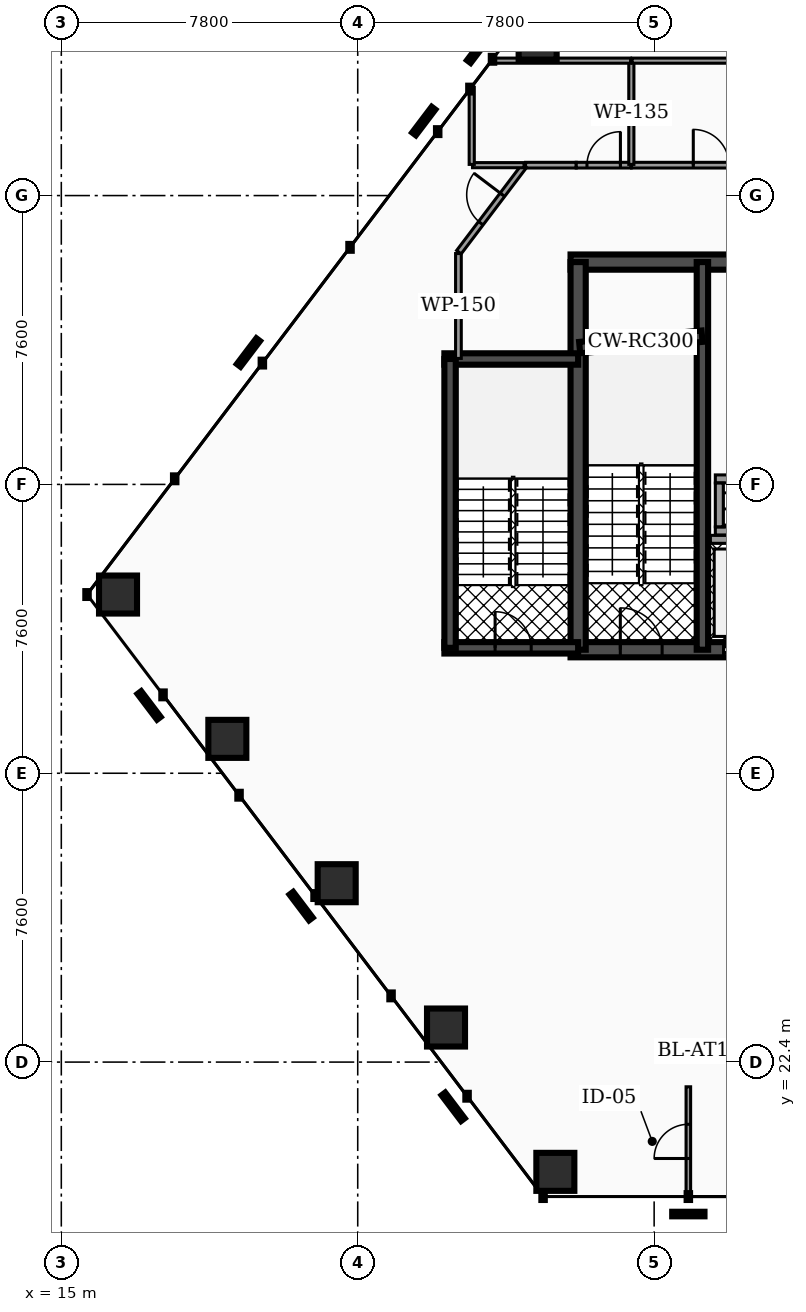
"""IFC4 building model, lengths in metres.
Left out: names, types, materials, properties, quantities, classifications, styles, units other than length and angle.
Written with IfcOpenShell. Run it as: python <this file> out.ifc"""

import sys

from ifc_helpers import new_model, si_unit, direction, frame, frame_2d, origin, origin_2d, place, context, subcontext, project, spatial, rectangle, hollow_rectangle, extrude, element, fill, save


model = new_model("IFC4")
c1 = context("Model", 3, precision=1e-05, world=origin(), true_north=direction((0.0, 1.0)))
c2 = subcontext(c1, "Body", "Model", "MODEL_VIEW")
j1 = project(units=[si_unit("LENGTHUNIT", "METRE"), si_unit("PLANEANGLEUNIT", "RADIAN")], contexts=[c1])
p1 = place(None, origin())
s1 = spatial("IfcSite", under=j1, at=p1, CompositionType="ELEMENT")
p2 = place(p1, origin())
s2 = spatial("IfcBuilding", under=s1, at=p2, CompositionType="ELEMENT")
p3 = place(p2, frame((0.0, 0.0, 52.02)))
s3 = spatial("IfcBuildingStorey", under=s2, at=p3, CompositionType="ELEMENT", Elevation=52.02)
p4 = place(p3, frame((28.4, 43.45, 0.0), z_axis=(0.0, 0.0, 1.0), x_axis=(1.0, 0.0, 0.0)))
e1 = element("IfcWall", 1, at=p4, inside=s3, PredefinedType="SHEAR", context=c2, shape_type="SweptSolid", body=[
    extrude(rectangle(XDim=20.06, YDim=0.4, at=frame_2d((10.03, 0.0))), origin(), (0.0, 0.0, 1.0), 3.82),
])
p5 = place(p3, frame((28.4, 33.25, 0.0), z_axis=(0.0, 0.0, 1.0), x_axis=(1.0, 0.0, 0.0)))
e2 = element("IfcWall", 2, at=p5, inside=s3, PredefinedType="SHEAR", context=c2, shape_type="SweptSolid", body=[
    extrude(rectangle(XDim=20.06, YDim=0.4, at=frame_2d((10.03, 0.0))), origin(), (0.0, 0.0, 1.0), 3.82),
])
p6 = place(p5, frame((4.03, 0.0, 0.0)))
e3 = element("IfcOpeningElement", 3, at=p6, cuts=e2, PredefinedType="OPENING", context=c2, shape_type="SweptSolid", body=[
    extrude(rectangle(XDim=1.1, YDim=2.15, at=frame_2d((0.55, 1.075))), frame((0.0, 0.21, 0.0), z_axis=(0.0, -1.0, 0.0), x_axis=(1.0, 0.0, 0.0)), (0.0, 0.0, 1.0), 0.42),
])
p7 = place(p5, frame((14.87, 0.0, 0.0)))
e4 = element("IfcOpeningElement", 4, at=p7, cuts=e2, PredefinedType="OPENING", context=c2, shape_type="SweptSolid", body=[
    extrude(rectangle(XDim=1.1, YDim=2.15, at=frame_2d((0.55, 1.075))), frame((0.0, 0.21, 0.0), z_axis=(0.0, -1.0, 0.0), x_axis=(1.0, 0.0, 0.0)), (0.0, 0.0, 1.0), 0.42),
])
p8 = place(p5, frame((1.31, 0.0, 0.0)))
e5 = element("IfcOpeningElement", 5, at=p8, cuts=e2, PredefinedType="OPENING", context=c2, shape_type="SweptSolid", body=[
    extrude(rectangle(XDim=1.1, YDim=2.2, at=frame_2d((0.55, 1.1))), frame((0.0, 0.21, 0.0), z_axis=(0.0, -1.0, 0.0), x_axis=(1.0, 0.0, 0.0)), (0.0, 0.0, 1.0), 0.42),
])
p9 = place(p5, frame((9.44, 0.0, 0.0)))
e6 = element("IfcOpeningElement", 6, at=p9, cuts=e2, PredefinedType="OPENING", context=c2, shape_type="SweptSolid", body=[
    extrude(rectangle(XDim=1.12, YDim=2.05, at=frame_2d((0.56, 1.025))), frame((0.0, 0.21, 0.0), z_axis=(0.0, -1.0, 0.0), x_axis=(1.0, 0.0, 0.0)), (0.0, 0.0, 1.0), 0.42),
])
p10 = place(p5, frame((17.65, 0.0, 0.0)))
e7 = element("IfcOpeningElement", 7, at=p10, cuts=e2, PredefinedType="OPENING", context=c2, shape_type="SweptSolid", body=[
    extrude(rectangle(XDim=1.1, YDim=2.2, at=frame_2d((0.55, 1.1))), frame((0.0, 0.21, 0.0), z_axis=(0.0, -1.0, 0.0), x_axis=(1.0, 0.0, 0.0)), (0.0, 0.0, 1.0), 0.42),
])
p11 = place(p3, frame((28.6, 33.25, 0.0), z_axis=(0.0, 0.0, 1.0), x_axis=(0.0, 1.0, 0.0)))
e8 = element("IfcWall", 8, at=p11, inside=s3, PredefinedType="SHEAR", context=c2, shape_type="SweptSolid", body=[
    extrude(rectangle(XDim=10.2, YDim=0.4, at=frame_2d((5.1, 0.0))), origin(), (0.0, 0.0, 1.0), 3.82),
])
p12 = place(p3, frame((31.87, 33.25, 0.0), z_axis=(0.0, 0.0, 1.0), x_axis=(0.0, 1.0, 0.0)))
e9 = element("IfcWall", 9, at=p12, inside=s3, PredefinedType="SHEAR", context=c2, shape_type="SweptSolid", body=[
    extrude(rectangle(XDim=10.2, YDim=0.3, at=frame_2d((5.1, 0.0))), origin(), (0.0, 0.0, 1.0), 3.82),
])
p13 = place(p3, frame((28.64, 41.2, 0.0), z_axis=(0.0, 0.0, 1.0), x_axis=(0.995687118776, 0.092774789157, 0.0)))
e10 = element("IfcWall", 10, at=p13, inside=s3, PredefinedType="SHEAR", context=c2, shape_type="SweptSolid", body=[
    extrude(rectangle(XDim=3.234, YDim=0.3, at=frame_2d((1.617, 0.0))), origin(), (0.0, 0.0, 1.0), 3.82),
])
p14 = place(p3, frame((25.08, 40.9, 0.0), z_axis=(0.0, 0.0, 1.0), x_axis=(1.0, 0.0, 0.0)))
e11 = element("IfcWall", 11, at=p14, inside=s3, PredefinedType="SHEAR", context=c2, shape_type="SweptSolid", body=[
    extrude(rectangle(XDim=3.52, YDim=0.3, at=frame_2d((1.76, 0.0))), origin(), (0.0, 0.0, 1.0), 3.82),
])
p15 = place(p3, frame((25.08, 33.3, 0.0), z_axis=(0.0, 0.0, 1.0), x_axis=(1.0, 0.0, 0.0)))
e12 = element("IfcWall", 12, at=p15, inside=s3, PredefinedType="SHEAR", context=c2, shape_type="SweptSolid", body=[
    extrude(rectangle(XDim=3.52, YDim=0.3, at=frame_2d((1.76, 0.0))), origin(), (0.0, 0.0, 1.0), 3.82),
])
p16 = place(p15, frame((1.335, 0.0, 0.0)))
e13 = element("IfcOpeningElement", 13, at=p16, cuts=e12, PredefinedType="OPENING", context=c2, shape_type="SweptSolid", body=[
    extrude(rectangle(XDim=0.95, YDim=2.2, at=frame_2d((0.475, 1.1))), frame((0.0, 0.16, 0.0), z_axis=(0.0, -1.0, 0.0), x_axis=(1.0, 0.0, 0.0)), (0.0, 0.0, 1.0), 0.32),
])
p17 = place(p3, frame((25.23, 33.3, 0.0), z_axis=(0.0, 0.0, 1.0), x_axis=(0.0, 1.0, 0.0)))
e14 = element("IfcWall", 14, at=p17, inside=s3, PredefinedType="SHEAR", context=c2, shape_type="SweptSolid", body=[
    extrude(rectangle(XDim=7.6, YDim=0.3, at=frame_2d((3.8, 0.0))), origin(), (0.0, 0.0, 1.0), 3.82),
])
for number, where, z_axis, x_axis in (
    (15, (27.534, 49.278, 0.0), (0.0, 0.0, 1.0), (1.0, 0.0, 0.0)),
    (16, (16.492, 34.702, 0.0), (0.0, 0.0, 1.0), (1.0, 0.0, 0.0)),
    (17, (19.369, 30.905, 0.0), (0.0, 0.0, 1.0), (1.0, 0.0, 0.0)),
    (18, (22.246, 27.107, 0.0), (0.0, 0.0, 1.0), (1.0, 0.0, 0.0)),
    (19, (25.123, 23.309, 0.0), (0.0, 0.0, 1.0), (1.0, 0.0, 0.0)),
    (20, (28.0, 19.512, 0.0), (0.0, 0.0, 1.0), (1.0, 0.0, 0.0)),
):
    element("IfcColumn", number, at=place(p3, frame(where, z_axis=z_axis, x_axis=x_axis)), inside=s3, PredefinedType="COLUMN", context=c2, shape_type="SweptSolid", body=[
        extrude(hollow_rectangle(XDim=1.0, YDim=1.0, WallThickness=0.05, at=origin_2d()), origin(), (0.0, 0.0, 1.0), 3.82),
    ])
p18 = place(p3, frame((32.08, 36.155, 0.0), z_axis=(0.0, 0.0, 1.0), x_axis=(1.0, 0.0, 0.0)))
e21 = element("IfcWall", 21, at=p18, inside=s3, PredefinedType="SOLIDWALL", context=c2, shape_type="SweptSolid", body=[
    extrude(rectangle(XDim=1.8, YDim=0.21, at=frame_2d((0.9, 0.0))), origin(), (0.0, 0.0, 1.0), 2.792),
])
for number, where, z_axis, x_axis in (
    (22, (32.21, 36.375, 0.0), (0.0, 0.0, 1.0), (1.0, 0.0, 0.0)),
    (23, (32.21, 37.745, 0.0), (0.0, 0.0, 1.0), (1.0, 0.0, 0.0)),
):
    element("IfcWall", number, at=place(p3, frame(where, z_axis=z_axis, x_axis=x_axis)), inside=s3, PredefinedType="SOLIDWALL", context=c2, shape_type="SweptSolid", body=[
        extrude(rectangle(XDim=1.6, YDim=0.21, at=frame_2d((0.8, 0.0))), origin(), (0.0, 0.0, 1.0), 3.82),
    ])
p19 = place(p3, frame((32.315, 36.485, 0.0), z_axis=(0.0, 0.0, 1.0), x_axis=(0.0, 1.0, 0.0)))
e24 = element("IfcWall", 24, at=p19, inside=s3, PredefinedType="SOLIDWALL", context=c2, shape_type="SweptSolid", body=[
    extrude(rectangle(XDim=1.15, YDim=0.21, at=frame_2d((0.575, 0.0))), origin(), (0.0, 0.0, 1.0), 3.82),
])
p20 = place(p3, frame((27.217, 46.0, 0.0), z_axis=(0.0, 0.0, 1.0), x_axis=(1.0, 0.0, 0.0)))
e25 = element("IfcWall", 25, at=p20, inside=s3, PredefinedType="PARTITIONING", context=c2, shape_type="SweptSolid", body=[
    extrude(rectangle(XDim=1.333, YDim=0.15, at=frame_2d((0.667, 0.0))), origin(), (0.0, 0.0, 1.0), 2.777),
])
p21 = place(p3, frame((28.55, 46.0, 0.0), z_axis=(0.0, 0.0, 1.0), x_axis=(1.0, 0.0, 0.0)))
e26 = element("IfcWall", 26, at=p21, inside=s3, PredefinedType="PARTITIONING", context=c2, shape_type="SweptSolid", body=[
    extrude(rectangle(XDim=1.445, YDim=0.15, at=frame_2d((0.723, 0.0))), origin(), (0.0, 0.0, 1.0), 2.777),
])
p22 = place(p21, frame((0.282, 0.0, 0.0)))
e27 = element("IfcOpeningElement", 27, at=p22, cuts=e26, PredefinedType="OPENING", context=c2, shape_type="SweptSolid", body=[
    extrude(rectangle(XDim=0.88, YDim=2.05, at=frame_2d((0.44, 1.025))), frame((0.0, 0.085, 0.0), z_axis=(0.0, -1.0, 0.0), x_axis=(1.0, 0.0, 0.0)), (0.0, 0.0, 1.0), 0.17),
])
p23 = place(p3, frame((30.005, 46.0, 0.0), z_axis=(0.0, 0.0, 1.0), x_axis=(1.0, 0.0, 0.0)))
e28 = element("IfcWall", 28, at=p23, inside=s3, PredefinedType="PARTITIONING", context=c2, shape_type="SweptSolid", body=[
    extrude(rectangle(XDim=4.19, YDim=0.15, at=frame_2d((2.095, 0.0))), origin(), (0.0, 0.0, 1.0), 2.777),
])
p24 = place(p23, frame((1.625, 0.0, 0.0)))
e29 = element("IfcOpeningElement", 29, at=p24, cuts=e28, PredefinedType="OPENING", context=c2, shape_type="SweptSolid", body=[
    extrude(rectangle(XDim=0.94, YDim=2.05, at=frame_2d((0.47, 1.025))), frame((0.0, 0.085, 0.0), z_axis=(0.0, -1.0, 0.0), x_axis=(1.0, 0.0, 0.0)), (0.0, 0.0, 1.0), 0.17),
])
p25 = place(p3, frame((25.45, 40.915, 0.0), z_axis=(0.0, 0.0, 1.0), x_axis=(0.0, 1.0, 0.0)))
e30 = element("IfcWall", 30, at=p25, inside=s3, PredefinedType="PARTITIONING", context=c2, shape_type="SweptSolid", body=[
    extrude(rectangle(XDim=2.759, YDim=0.15, at=frame_2d((1.38, 0.0))), origin(), (0.0, 0.0, 1.0), 2.777),
])
p26 = place(p3, frame((25.462, 43.71, 0.0), z_axis=(0.0, 0.0, 1.0), x_axis=(0.603800014115, 0.797135837204, 0.0)))
e31 = element("IfcWall", 31, at=p26, inside=s3, PredefinedType="PARTITIONING", context=c2, shape_type="SweptSolid", body=[
    extrude(rectangle(XDim=2.853, YDim=0.15, at=frame_2d((1.426, 0.0))), origin(), (0.0, 0.0, 1.0), 2.777),
])
p27 = place(p26, frame((0.956, 0.0, 0.0)))
e32 = element("IfcOpeningElement", 32, at=p27, cuts=e31, PredefinedType="OPENING", context=c2, shape_type="SweptSolid", body=[
    extrude(rectangle(XDim=0.94, YDim=2.05, at=frame_2d((0.47, 1.025))), frame((0.0, 0.085, 0.0), z_axis=(0.0, -1.0, 0.0), x_axis=(1.0, 0.0, 0.0)), (0.0, 0.0, 1.0), 0.17),
])
p28 = place(p3, frame((30.0, 46.02, 0.0), z_axis=(0.0, 0.0, 1.0), x_axis=(0.0, 1.0, 0.0)))
e33 = element("IfcWall", 33, at=p28, inside=s3, PredefinedType="PARTITIONING", context=c2, shape_type="SweptSolid", body=[
    extrude(rectangle(XDim=2.71, YDim=0.135, at=frame_2d((1.355, 0.0))), origin(), (0.0, 0.0, 1.0), 2.777),
])
p29 = place(p3, frame((25.82, 46.0, 0.0), z_axis=(0.0, 0.0, 1.0), x_axis=(1.0, 0.0, 0.0)))
e34 = element("IfcWall", 34, at=p29, inside=s3, PredefinedType="PARTITIONING", context=c2, shape_type="SweptSolid", body=[
    extrude(rectangle(XDim=1.356, YDim=0.135, at=frame_2d((0.678, 0.0))), origin(), (0.0, 0.0, 1.0), 2.777),
])
p30 = place(p3, frame((25.8, 46.02, 0.0), z_axis=(0.0, 0.0, 1.0), x_axis=(0.0, 1.0, 0.0)))
e35 = element("IfcWall", 35, at=p30, inside=s3, PredefinedType="PARTITIONING", context=c2, shape_type="SweptSolid", body=[
    extrude(rectangle(XDim=2.03, YDim=0.135, at=frame_2d((1.015, 0.0))), origin(), (0.0, 0.0, 1.0), 2.777),
])
p31 = place(p3, frame((26.334, 48.75, 0.0), z_axis=(0.0, 0.0, 1.0), x_axis=(1.0, 0.0, 0.0)))
e36 = element("IfcWall", 36, at=p31, inside=s3, PredefinedType="PARTITIONING", context=c2, shape_type="SweptSolid", body=[
    extrude(rectangle(XDim=3.646, YDim=0.135, at=frame_2d((1.823, 0.0))), origin(), (0.0, 0.0, 1.0), 2.777),
])
p32 = place(p3, frame((30.02, 48.75, 0.0), z_axis=(0.0, 0.0, 1.0), x_axis=(1.0, 0.0, 0.0)))
e37 = element("IfcWall", 37, at=p32, inside=s3, PredefinedType="PARTITIONING", context=c2, shape_type="SweptSolid", body=[
    extrude(rectangle(XDim=4.16, YDim=0.135, at=frame_2d((2.08, 0.0))), origin(), (0.0, 0.0, 1.0), 2.777),
])
p33 = place(p3, frame((31.5, 18.877, 0.0), z_axis=(0.0, 0.0, 1.0), x_axis=(0.0, 1.0, 0.0)))
e38 = element("IfcWall", 38, at=p33, inside=s3, PredefinedType="PARTITIONING", context=c2, shape_type="SweptSolid", body=[
    extrude(rectangle(XDim=2.873, YDim=0.12, at=frame_2d((1.437, 0.0))), origin(), (0.0, 0.0, 1.0), 2.777),
])
p34 = place(p33, frame((0.987, 0.0, 0.0)))
e39 = element("IfcOpeningElement", 39, at=p34, cuts=e38, PredefinedType="OPENING", context=c2, shape_type="SweptSolid", body=[
    extrude(rectangle(XDim=0.9, YDim=2.05, at=frame_2d((0.45, 1.025))), frame((0.0, 0.07, 0.0), z_axis=(0.0, -1.0, 0.0), x_axis=(1.0, 0.0, 0.0)), (0.0, 0.0, 1.0), 0.14),
])
p35 = place(p6, origin())
e40 = element("IfcDoor", 40, at=p35, inside=s3, OperationType="SLIDING_TO_LEFT", PredefinedType="DOOR", context=c2, shape_type="SweptSolid", body=[
    extrude(rectangle(XDim=1.1, YDim=2.15, at=frame_2d((0.55, 1.075))), frame((0.0, 0.025, 0.0), z_axis=(0.0, -1.0, 0.0), x_axis=(1.0, 0.0, 0.0)), (0.0, 0.0, 1.0), 0.05),
])
fill(e3, e40)
p36 = place(p8, origin())
e41 = element("IfcDoor", 41, at=p36, inside=s3, OperationType="SINGLE_SWING_LEFT", PredefinedType="DOOR", context=c2, shape_type="SweptSolid", body=[
    extrude(rectangle(XDim=1.1, YDim=2.2, at=frame_2d((0.55, 1.1))), frame((0.0, 0.025, 0.0), z_axis=(0.0, -1.0, 0.0), x_axis=(1.0, 0.0, 0.0)), (0.0, 0.0, 1.0), 0.05),
])
fill(e5, e41)
p37 = place(p16, origin())
e42 = element("IfcDoor", 42, at=p37, inside=s3, OperationType="SINGLE_SWING_LEFT", PredefinedType="DOOR", context=c2, shape_type="SweptSolid", body=[
    extrude(rectangle(XDim=0.95, YDim=2.2, at=frame_2d((0.475, 1.1))), frame((0.0, 0.025, 0.0), z_axis=(0.0, -1.0, 0.0), x_axis=(1.0, 0.0, 0.0)), (0.0, 0.0, 1.0), 0.05),
])
fill(e13, e42)
p38 = place(p22, origin())
e43 = element("IfcDoor", 43, at=p38, inside=s3, OperationType="SINGLE_SWING_RIGHT", PredefinedType="DOOR", context=c2, shape_type="SweptSolid", body=[
    extrude(rectangle(XDim=0.88, YDim=2.05, at=frame_2d((0.44, 1.025))), frame((0.0, 0.025, 0.0), z_axis=(0.0, -1.0, 0.0), x_axis=(1.0, 0.0, 0.0)), (0.0, 0.0, 1.0), 0.05),
])
fill(e27, e43)
p39 = place(p24, origin())
e44 = element("IfcDoor", 44, at=p39, inside=s3, OperationType="SINGLE_SWING_LEFT", PredefinedType="DOOR", context=c2, shape_type="SweptSolid", body=[
    extrude(rectangle(XDim=0.94, YDim=2.05, at=frame_2d((0.47, 1.025))), frame((0.0, 0.025, 0.0), z_axis=(0.0, -1.0, 0.0), x_axis=(1.0, 0.0, 0.0)), (0.0, 0.0, 1.0), 0.05),
])
fill(e29, e44)
p40 = place(p27, origin())
e45 = element("IfcDoor", 45, at=p40, inside=s3, OperationType="SINGLE_SWING_RIGHT", PredefinedType="DOOR", context=c2, shape_type="SweptSolid", body=[
    extrude(rectangle(XDim=0.94, YDim=2.05, at=frame_2d((0.47, 1.025))), frame((0.0, 0.025, 0.0), z_axis=(0.0, -1.0, 0.0), x_axis=(1.0, 0.0, 0.0)), (0.0, 0.0, 1.0), 0.05),
])
fill(e32, e45)
p41 = place(p34, origin())
e46 = element("IfcDoor", 46, at=p41, inside=s3, OperationType="SINGLE_SWING_LEFT", PredefinedType="DOOR", context=c2, shape_type="SweptSolid", body=[
    extrude(rectangle(XDim=0.9, YDim=2.05, at=frame_2d((0.45, 1.025))), frame((0.0, 0.025, 0.0), z_axis=(0.0, -1.0, 0.0), x_axis=(1.0, 0.0, 0.0)), (0.0, 0.0, 1.0), 0.05),
])
fill(e39, e46)
save(model, sys.argv[1])
